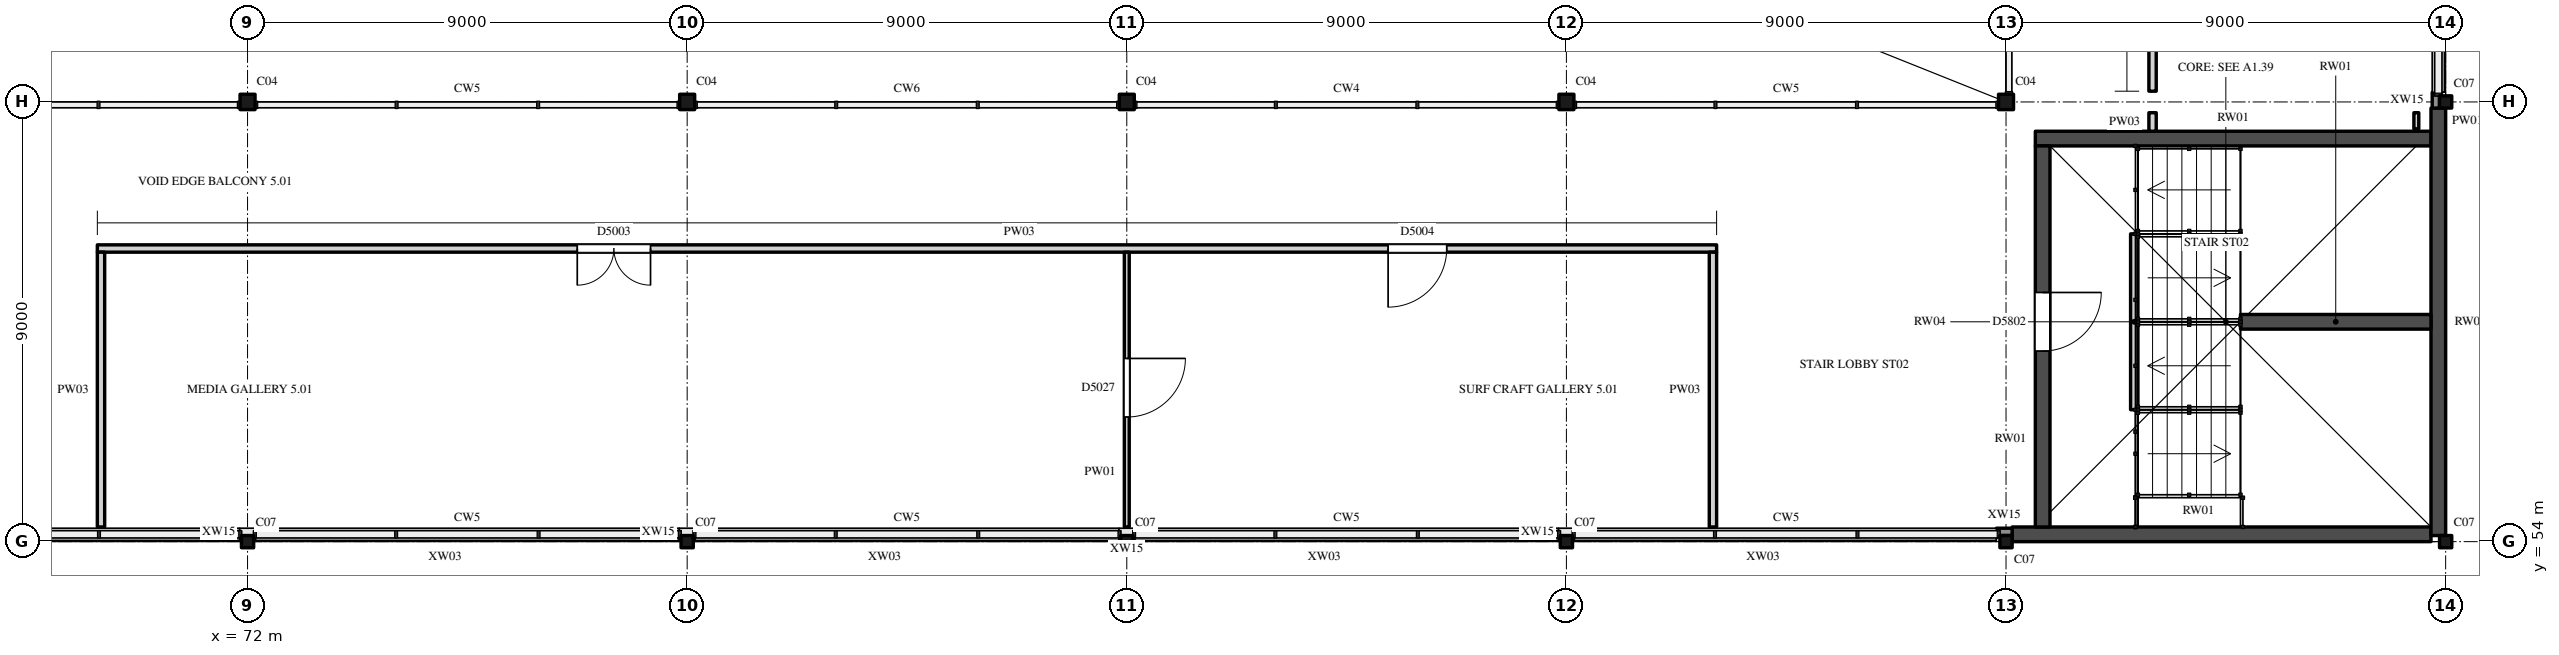
"""IFC4 building model, lengths in metres.
Left out: names, types, materials, properties, quantities, classifications, styles, units other than length and angle.
Written with IfcOpenShell. Run it as: python <this file> out.ifc"""

import sys

from ifc_helpers import new_model, si_unit, direction, frame, frame_2d, origin, origin_2d, place, context, subcontext, project, spatial, rectangle, hollow_rectangle, i_section, extrude, element, fill, save


model = new_model("IFC4")
c1 = context("Model", 3, precision=1e-05, world=origin(), true_north=direction((0.0, 1.0)))
c2 = subcontext(c1, "Body", "Model", "MODEL_VIEW")
j1 = project(units=[si_unit("LENGTHUNIT", "METRE"), si_unit("PLANEANGLEUNIT", "RADIAN")], contexts=[c1])
p1 = place(None, origin())
s1 = spatial("IfcSite", under=j1, at=p1, CompositionType="ELEMENT")
p2 = place(p1, origin())
s2 = spatial("IfcBuilding", under=s1, at=p2, CompositionType="ELEMENT")
p3 = place(p2, frame((0.0, 0.0, 31.0)))
s3 = spatial("IfcBuildingStorey", under=s2, at=p3, CompositionType="ELEMENT", Elevation=31.0)
for number, where, z_axis, x_axis in (
    (1, (72.0, 54.0, 0.0), (0.0, 0.0, 1.0), (1.0, 0.0, 0.0)),
    (2, (81.0, 54.0, 0.0), (0.0, 0.0, 1.0), (1.0, 0.0, 0.0)),
    (3, (90.0, 54.0, 0.0), (0.0, 0.0, 1.0), (1.0, 0.0, 0.0)),
    (4, (99.0, 54.0, 0.0), (0.0, 0.0, 1.0), (1.0, 0.0, 0.0)),
    (5, (108.0, 54.0, 0.0), (0.0, 0.0, 1.0), (1.0, 0.0, 0.0)),
    (6, (117.0, 54.0, 0.0), (0.0, 0.0, 1.0), (1.0, 0.0, 0.0)),
):
    element("IfcColumn", number, at=place(p3, frame(where, z_axis=z_axis, x_axis=x_axis)), inside=s3, PredefinedType="COLUMN", context=c2, shape_type="SweptSolid", body=[
        extrude(hollow_rectangle(XDim=0.25, YDim=0.25, WallThickness=0.009, InnerFilletRadius=0.013, OuterFilletRadius=0.022, at=origin_2d()), origin(), (0.0, 0.0, 1.0), 5.0),
    ])
for number, where, z_axis, x_axis in (
    (7, (72.0, 63.0, 0.0), (0.0, 0.0, 1.0), (1.0, 0.0, 0.0)),
    (8, (81.0, 63.0, 0.0), (0.0, 0.0, 1.0), (1.0, 0.0, 0.0)),
    (9, (90.0, 63.0, 0.0), (0.0, 0.0, 1.0), (1.0, 0.0, 0.0)),
    (10, (99.0, 63.0, 0.0), (0.0, 0.0, 1.0), (1.0, 0.0, 0.0)),
    (11, (108.0, 63.0, 0.0), (0.0, 0.0, 1.0), (1.0, 0.0, 0.0)),
):
    element("IfcColumn", number, at=place(p3, frame(where, z_axis=z_axis, x_axis=x_axis)), inside=s3, PredefinedType="COLUMN", context=c2, shape_type="SweptSolid", body=[
        extrude(i_section(OverallWidth=0.307, OverallDepth=0.315, WebThickness=0.012, FlangeThickness=0.019, FilletRadius=0.017, at=origin_2d()), origin(), (0.0, 0.0, 1.0), 5.0),
    ])
p4 = place(p3, frame((117.0, 63.0, 0.0), z_axis=(0.0, 0.0, 1.0), x_axis=(1.0, 0.0, 0.0)))
e12 = element("IfcColumn", 12, at=p4, inside=s3, PredefinedType="COLUMN", context=c2, shape_type="SweptSolid", body=[
    extrude(hollow_rectangle(XDim=0.25, YDim=0.25, WallThickness=0.009, InnerFilletRadius=0.013, OuterFilletRadius=0.022, at=origin_2d()), origin(), (0.0, 0.0, 1.0), 5.0),
])
p5 = place(p3, frame((108.125, 54.15, 0.0), z_axis=(0.0, 0.0, 1.0), x_axis=(1.0, 0.0, 0.0)))
e13 = element("IfcWall", 13, at=p5, inside=s3, PredefinedType="SHEAR", context=c2, shape_type="SweptSolid", body=[
    extrude(rectangle(XDim=8.575, YDim=0.3, at=frame_2d((4.288, 0.0))), origin(), (0.0, 0.0, 1.0), 5.0),
])
p6 = place(p3, frame((108.6, 62.25, 0.0), z_axis=(0.0, 0.0, 1.0), x_axis=(1.0, 0.0, 0.0)))
e14 = element("IfcWall", 14, at=p6, inside=s3, PredefinedType="SHEAR", context=c2, shape_type="SweptSolid", body=[
    extrude(rectangle(XDim=8.1, YDim=0.3, at=frame_2d((4.05, 0.0))), origin(), (0.0, 0.0, 1.0), 5.0),
])
p7 = place(p3, frame((108.75, 54.3, 0.0), z_axis=(0.0, 0.0, 1.0), x_axis=(0.0, 1.0, 0.0)))
e15 = element("IfcWall", 15, at=p7, inside=s3, PredefinedType="SHEAR", context=c2, shape_type="SweptSolid", body=[
    extrude(rectangle(XDim=7.8, YDim=0.3, at=frame_2d((3.9, 0.0))), origin(), (0.0, 0.0, 1.0), 5.0),
])
p8 = place(p7, frame((3.6, 0.0, 0.0)))
e16 = element("IfcOpeningElement", 16, at=p8, cuts=e15, PredefinedType="OPENING", context=c2, shape_type="SweptSolid", body=[
    extrude(rectangle(XDim=1.2, YDim=2.1, at=frame_2d((0.6, 1.05))), frame((0.0, 0.16, 0.0), z_axis=(0.0, -1.0, 0.0), x_axis=(1.0, 0.0, 0.0)), (0.0, 0.0, 1.0), 0.32),
])
p9 = place(p3, frame((116.85, 54.125, 0.0), z_axis=(0.0, 0.0, 1.0), x_axis=(0.0, 1.0, 0.0)))
e17 = element("IfcWall", 17, at=p9, inside=s3, PredefinedType="SHEAR", context=c2, shape_type="SweptSolid", body=[
    extrude(rectangle(XDim=8.75, YDim=0.3, at=frame_2d((4.375, 0.0))), origin(), (0.0, 0.0, 1.0), 5.0),
])
p10 = place(p3, frame((112.8, 58.5, 0.0), z_axis=(0.0, 0.0, 1.0), x_axis=(1.0, 0.0, 0.0)))
e18 = element("IfcWall", 18, at=p10, inside=s3, PredefinedType="SHEAR", context=c2, shape_type="SweptSolid", body=[
    extrude(rectangle(XDim=3.9, YDim=0.3, at=frame_2d((1.95, 0.0))), origin(), (0.0, 0.0, 1.0), 5.0),
])
p11 = place(p3, frame((110.625, 56.7, 0.0), z_axis=(0.0, 0.0, 1.0), x_axis=(0.0, 1.0, 0.0)))
e19 = element("IfcWall", 19, at=p11, inside=s3, PredefinedType="STANDARD", context=c2, shape_type="SweptSolid", body=[
    extrude(rectangle(XDim=3.6, YDim=0.15, at=frame_2d((1.8, 0.0))), origin(), (0.0, 0.0, 1.0), 2.3),
])
p12 = place(p3, frame((63.197, 54.15, 0.0), z_axis=(0.0, 0.0, 1.0), x_axis=(1.0, 0.0, 0.0)))
e20 = element("IfcWall", 20, at=p12, inside=s3, PredefinedType="SOLIDWALL", context=c2, shape_type="SweptSolid", body=[
    extrude(rectangle(XDim=8.642, YDim=0.25, at=frame_2d((4.321, 0.0))), origin(), (0.0, 0.0, 1.0), 1.1),
])
for number, where, z_axis, x_axis in (
    (21, (72.161, 54.15, 0.0), (0.0, 0.0, 1.0), (1.0, 0.0, 0.0)),
    (22, (81.161, 54.15, 0.0), (0.0, 0.0, 1.0), (1.0, 0.0, 0.0)),
    (23, (90.161, 54.15, 0.0), (0.0, 0.0, 1.0), (1.0, 0.0, 0.0)),
):
    element("IfcWall", number, at=place(p3, frame(where, z_axis=z_axis, x_axis=x_axis)), inside=s3, PredefinedType="SOLIDWALL", context=c2, shape_type="SweptSolid", body=[
        extrude(rectangle(XDim=8.678, YDim=0.25, at=frame_2d((4.339, 0.0))), origin(), (0.0, 0.0, 1.0), 1.1),
    ])
for number, where, z_axis, x_axis in (
    (24, (99.161, 54.15, 0.0), (0.0, 0.0, 1.0), (1.0, 0.0, 0.0)),
    (25, (116.85, 63.197, 0.0), (0.0, 0.0, 1.0), (0.0, 1.0, 0.0)),
):
    element("IfcWall", number, at=place(p3, frame(where, z_axis=z_axis, x_axis=x_axis)), inside=s3, PredefinedType="SOLIDWALL", context=c2, shape_type="SweptSolid", body=[
        extrude(rectangle(XDim=8.642, YDim=0.25, at=frame_2d((4.321, 0.0))), origin(), (0.0, 0.0, 1.0), 1.1),
    ])
for number, where, z_axis, x_axis in (
    (26, (71.839, 54.2, 0.0), (0.0, 0.0, 1.0), (1.0, 0.0, 0.0)),
    (27, (80.839, 54.2, 0.0), (0.0, 0.0, 1.0), (1.0, 0.0, 0.0)),
    (28, (89.839, 54.2, 0.0), (0.0, 0.0, 1.0), (1.0, 0.0, 0.0)),
    (29, (98.839, 54.2, 0.0), (0.0, 0.0, 1.0), (1.0, 0.0, 0.0)),
):
    element("IfcWall", number, at=place(p3, frame(where, z_axis=z_axis, x_axis=x_axis)), inside=s3, PredefinedType="SOLIDWALL", context=c2, shape_type="SweptSolid", body=[
        extrude(rectangle(XDim=0.322, YDim=0.15, at=frame_2d((0.161, 0.0))), origin(), (0.0, 0.0, 1.0), 1.1),
    ])
for number, where, z_axis, x_axis in (
    (30, (107.803, 54.2, 0.0), (0.0, 0.0, 1.0), (1.0, 0.0, 0.0)),
    (31, (116.8, 62.875, 0.0), (0.0, 0.0, 1.0), (0.0, 1.0, 0.0)),
):
    element("IfcWall", number, at=place(p3, frame(where, z_axis=z_axis, x_axis=x_axis)), inside=s3, PredefinedType="SOLIDWALL", context=c2, shape_type="SweptSolid", body=[
        extrude(rectangle(XDim=0.322, YDim=0.15, at=frame_2d((0.161, 0.0))), origin(), (0.0, 0.0, 1.0), 5.0),
    ])
p13 = place(p2, frame((0.0, 0.0, 16.0)))
s4 = spatial("IfcBuildingStorey", under=s2, at=p13, CompositionType="ELEMENT", Elevation=16.0)
p14 = place(p13, frame((117.15, 63.0, 16.0), z_axis=(0.0, 0.0, 1.0), x_axis=(1.0, 0.0, 0.0)))
e32 = element("IfcWall", 32, at=p14, inside=s4, PredefinedType="SOLIDWALL", context=c2, shape_type="SweptSolid", body=[
    extrude(rectangle(XDim=53.7, YDim=0.3, at=frame_2d((26.85, 0.0))), origin(), (0.0, 0.0, 1.0), 0.9),
])
p15 = place(p14, frame((0.15, 0.0, 0.15)))
e33 = element("IfcOpeningElement", 33, at=p15, cuts=e32, PredefinedType="OPENING", context=c2, shape_type="SweptSolid", body=[
    extrude(rectangle(XDim=2.4, YDim=0.6, at=frame_2d((1.2, 0.3))), frame((0.0, 0.16, 0.0), z_axis=(0.0, -1.0, 0.0), x_axis=(1.0, 0.0, 0.0)), (0.0, 0.0, 1.0), 0.32),
])
p16 = place(p14, frame((3.15, 0.0, 0.15)))
e34 = element("IfcOpeningElement", 34, at=p16, cuts=e32, PredefinedType="OPENING", context=c2, shape_type="SweptSolid", body=[
    extrude(rectangle(XDim=2.4, YDim=0.6, at=frame_2d((1.2, 0.3))), frame((0.0, 0.16, 0.0), z_axis=(0.0, -1.0, 0.0), x_axis=(1.0, 0.0, 0.0)), (0.0, 0.0, 1.0), 0.32),
])
p17 = place(p14, frame((6.15, 0.0, 0.15)))
e35 = element("IfcOpeningElement", 35, at=p17, cuts=e32, PredefinedType="OPENING", context=c2, shape_type="SweptSolid", body=[
    extrude(rectangle(XDim=2.4, YDim=0.6, at=frame_2d((1.2, 0.3))), frame((0.0, 0.16, 0.0), z_axis=(0.0, -1.0, 0.0), x_axis=(1.0, 0.0, 0.0)), (0.0, 0.0, 1.0), 0.32),
])
p18 = place(p14, frame((9.15, 0.0, 0.15)))
e36 = element("IfcOpeningElement", 36, at=p18, cuts=e32, PredefinedType="OPENING", context=c2, shape_type="SweptSolid", body=[
    extrude(rectangle(XDim=2.4, YDim=0.6, at=frame_2d((1.2, 0.3))), frame((0.0, 0.16, 0.0), z_axis=(0.0, -1.0, 0.0), x_axis=(1.0, 0.0, 0.0)), (0.0, 0.0, 1.0), 0.32),
])
p19 = place(p14, frame((12.15, 0.0, 0.15)))
e37 = element("IfcOpeningElement", 37, at=p19, cuts=e32, PredefinedType="OPENING", context=c2, shape_type="SweptSolid", body=[
    extrude(rectangle(XDim=2.4, YDim=0.6, at=frame_2d((1.2, 0.3))), frame((0.0, 0.16, 0.0), z_axis=(0.0, -1.0, 0.0), x_axis=(1.0, 0.0, 0.0)), (0.0, 0.0, 1.0), 0.32),
])
p20 = place(p14, frame((15.15, 0.0, 0.15)))
e38 = element("IfcOpeningElement", 38, at=p20, cuts=e32, PredefinedType="OPENING", context=c2, shape_type="SweptSolid", body=[
    extrude(rectangle(XDim=2.4, YDim=0.6, at=frame_2d((1.2, 0.3))), frame((0.0, 0.16, 0.0), z_axis=(0.0, -1.0, 0.0), x_axis=(1.0, 0.0, 0.0)), (0.0, 0.0, 1.0), 0.32),
])
p21 = place(p14, frame((18.15, 0.0, 0.15)))
e39 = element("IfcOpeningElement", 39, at=p21, cuts=e32, PredefinedType="OPENING", context=c2, shape_type="SweptSolid", body=[
    extrude(rectangle(XDim=2.4, YDim=0.6, at=frame_2d((1.2, 0.3))), frame((0.0, 0.16, 0.0), z_axis=(0.0, -1.0, 0.0), x_axis=(1.0, 0.0, 0.0)), (0.0, 0.0, 1.0), 0.32),
])
p22 = place(p14, frame((21.15, 0.0, 0.15)))
e40 = element("IfcOpeningElement", 40, at=p22, cuts=e32, PredefinedType="OPENING", context=c2, shape_type="SweptSolid", body=[
    extrude(rectangle(XDim=2.4, YDim=0.6, at=frame_2d((1.2, 0.3))), frame((0.0, 0.16, 0.0), z_axis=(0.0, -1.0, 0.0), x_axis=(1.0, 0.0, 0.0)), (0.0, 0.0, 1.0), 0.32),
])
p23 = place(p14, frame((24.15, 0.0, 0.15)))
e41 = element("IfcOpeningElement", 41, at=p23, cuts=e32, PredefinedType="OPENING", context=c2, shape_type="SweptSolid", body=[
    extrude(rectangle(XDim=2.4, YDim=0.6, at=frame_2d((1.2, 0.3))), frame((0.0, 0.16, 0.0), z_axis=(0.0, -1.0, 0.0), x_axis=(1.0, 0.0, 0.0)), (0.0, 0.0, 1.0), 0.32),
])
p24 = place(p14, frame((27.15, 0.0, 0.15)))
e42 = element("IfcOpeningElement", 42, at=p24, cuts=e32, PredefinedType="OPENING", context=c2, shape_type="SweptSolid", body=[
    extrude(rectangle(XDim=2.4, YDim=0.6, at=frame_2d((1.2, 0.3))), frame((0.0, 0.16, 0.0), z_axis=(0.0, -1.0, 0.0), x_axis=(1.0, 0.0, 0.0)), (0.0, 0.0, 1.0), 0.32),
])
p25 = place(p14, frame((30.15, 0.0, 0.15)))
e43 = element("IfcOpeningElement", 43, at=p25, cuts=e32, PredefinedType="OPENING", context=c2, shape_type="SweptSolid", body=[
    extrude(rectangle(XDim=2.4, YDim=0.6, at=frame_2d((1.2, 0.3))), frame((0.0, 0.16, 0.0), z_axis=(0.0, -1.0, 0.0), x_axis=(1.0, 0.0, 0.0)), (0.0, 0.0, 1.0), 0.32),
])
p26 = place(p14, frame((33.15, 0.0, 0.15)))
e44 = element("IfcOpeningElement", 44, at=p26, cuts=e32, PredefinedType="OPENING", context=c2, shape_type="SweptSolid", body=[
    extrude(rectangle(XDim=2.4, YDim=0.6, at=frame_2d((1.2, 0.3))), frame((0.0, 0.16, 0.0), z_axis=(0.0, -1.0, 0.0), x_axis=(1.0, 0.0, 0.0)), (0.0, 0.0, 1.0), 0.32),
])
p27 = place(p14, frame((36.15, 0.0, 0.15)))
e45 = element("IfcOpeningElement", 45, at=p27, cuts=e32, PredefinedType="OPENING", context=c2, shape_type="SweptSolid", body=[
    extrude(rectangle(XDim=2.4, YDim=0.6, at=frame_2d((1.2, 0.3))), frame((0.0, 0.16, 0.0), z_axis=(0.0, -1.0, 0.0), x_axis=(1.0, 0.0, 0.0)), (0.0, 0.0, 1.0), 0.32),
])
p28 = place(p14, frame((39.15, 0.0, 0.15)))
e46 = element("IfcOpeningElement", 46, at=p28, cuts=e32, PredefinedType="OPENING", context=c2, shape_type="SweptSolid", body=[
    extrude(rectangle(XDim=2.4, YDim=0.6, at=frame_2d((1.2, 0.3))), frame((0.0, 0.16, 0.0), z_axis=(0.0, -1.0, 0.0), x_axis=(1.0, 0.0, 0.0)), (0.0, 0.0, 1.0), 0.32),
])
p29 = place(p14, frame((42.15, 0.0, 0.15)))
e47 = element("IfcOpeningElement", 47, at=p29, cuts=e32, PredefinedType="OPENING", context=c2, shape_type="SweptSolid", body=[
    extrude(rectangle(XDim=2.4, YDim=0.6, at=frame_2d((1.2, 0.3))), frame((0.0, 0.16, 0.0), z_axis=(0.0, -1.0, 0.0), x_axis=(1.0, 0.0, 0.0)), (0.0, 0.0, 1.0), 0.32),
])
p30 = place(p14, frame((45.15, 0.0, 0.15)))
e48 = element("IfcOpeningElement", 48, at=p30, cuts=e32, PredefinedType="OPENING", context=c2, shape_type="SweptSolid", body=[
    extrude(rectangle(XDim=2.4, YDim=0.6, at=frame_2d((1.2, 0.3))), frame((0.0, 0.16, 0.0), z_axis=(0.0, -1.0, 0.0), x_axis=(1.0, 0.0, 0.0)), (0.0, 0.0, 1.0), 0.32),
])
p31 = place(p14, frame((48.15, 0.0, 0.15)))
e49 = element("IfcOpeningElement", 49, at=p31, cuts=e32, PredefinedType="OPENING", context=c2, shape_type="SweptSolid", body=[
    extrude(rectangle(XDim=2.4, YDim=0.6, at=frame_2d((1.2, 0.3))), frame((0.0, 0.16, 0.0), z_axis=(0.0, -1.0, 0.0), x_axis=(1.0, 0.0, 0.0)), (0.0, 0.0, 1.0), 0.32),
])
p32 = place(p14, frame((51.15, 0.0, 0.15)))
e50 = element("IfcOpeningElement", 50, at=p32, cuts=e32, PredefinedType="OPENING", context=c2, shape_type="SweptSolid", body=[
    extrude(rectangle(XDim=2.4, YDim=0.6, at=frame_2d((1.2, 0.3))), frame((0.0, 0.16, 0.0), z_axis=(0.0, -1.0, 0.0), x_axis=(1.0, 0.0, 0.0)), (0.0, 0.0, 1.0), 0.32),
])
p33 = place(p3, frame((68.925, 60.0, 0.0), z_axis=(0.0, 0.0, 1.0), x_axis=(1.0, 0.0, 0.0)))
e51 = element("IfcWall", 51, at=p33, inside=s3, PredefinedType="PARTITIONING", context=c2, shape_type="SweptSolid", body=[
    extrude(rectangle(XDim=33.15, YDim=0.15, at=frame_2d((16.575, 0.0))), origin(), (0.0, 0.0, 1.0), 4.521),
])
p34 = place(p33, frame((9.825, 0.0, 0.0)))
e52 = element("IfcOpeningElement", 52, at=p34, cuts=e51, PredefinedType="OPENING", context=c2, shape_type="SweptSolid", body=[
    extrude(rectangle(XDim=1.5, YDim=2.4, at=frame_2d((0.75, 1.2))), frame((0.0, 0.085, 0.0), z_axis=(0.0, -1.0, 0.0), x_axis=(1.0, 0.0, 0.0)), (0.0, 0.0, 1.0), 0.17),
])
p35 = place(p33, frame((26.425, 0.0, 0.0)))
e53 = element("IfcOpeningElement", 53, at=p35, cuts=e51, PredefinedType="OPENING", context=c2, shape_type="SweptSolid", body=[
    extrude(rectangle(XDim=1.2, YDim=2.4, at=frame_2d((0.6, 1.2))), frame((0.0, 0.085, 0.0), z_axis=(0.0, -1.0, 0.0), x_axis=(1.0, 0.0, 0.0)), (0.0, 0.0, 1.0), 0.17),
])
p36 = place(p3, frame((69.0, 54.3, 0.0), z_axis=(0.0, 0.0, 1.0), x_axis=(0.0, 1.0, 0.0)))
e54 = element("IfcWall", 54, at=p36, inside=s3, PredefinedType="PARTITIONING", context=c2, shape_type="SweptSolid", body=[
    extrude(rectangle(XDim=5.625, YDim=0.15, at=frame_2d((2.812, 0.0))), origin(), (0.0, 0.0, 1.0), 4.825),
])
p37 = place(p3, frame((90.0, 54.3, 0.0), z_axis=(0.0, 0.0, 1.0), x_axis=(0.0, 1.0, 0.0)))
e55 = element("IfcWall", 55, at=p37, inside=s3, PredefinedType="PARTITIONING", context=c2, shape_type="SweptSolid", body=[
    extrude(rectangle(XDim=5.625, YDim=0.1, at=frame_2d((2.812, 0.0))), origin(), (0.0, 0.0, 1.0), 4.419),
])
p38 = place(p37, frame((2.25, 0.0, 0.0)))
e56 = element("IfcOpeningElement", 56, at=p38, cuts=e55, PredefinedType="OPENING", context=c2, shape_type="SweptSolid", body=[
    extrude(rectangle(XDim=1.2, YDim=2.4, at=frame_2d((0.6, 1.2))), frame((0.0, 0.06, 0.0), z_axis=(0.0, -1.0, 0.0), x_axis=(1.0, 0.0, 0.0)), (0.0, 0.0, 1.0), 0.12),
])
p39 = place(p3, frame((102.0, 54.3, 0.0), z_axis=(0.0, 0.0, 1.0), x_axis=(0.0, 1.0, 0.0)))
e57 = element("IfcWall", 57, at=p39, inside=s3, PredefinedType="PARTITIONING", context=c2, shape_type="SweptSolid", body=[
    extrude(rectangle(XDim=5.625, YDim=0.15, at=frame_2d((2.812, 0.0))), origin(), (0.0, 0.0, 1.0), 4.825),
])
p40 = place(p3, frame((111.0, 62.4, 0.0), z_axis=(0.0, 0.0, 1.0), x_axis=(0.0, 1.0, 0.0)))
e58 = element("IfcWall", 58, at=p40, inside=s3, PredefinedType="PARTITIONING", context=c2, shape_type="SweptSolid", body=[
    extrude(rectangle(XDim=0.38, YDim=0.15, at=frame_2d((0.19, 0.0))), origin(), (0.0, 0.0, 1.0), 4.825),
])
p41 = place(p3, frame((111.0, 63.22, 0.0), z_axis=(0.0, 0.0, 1.0), x_axis=(0.0, 1.0, 0.0)))
e59 = element("IfcWall", 59, at=p41, inside=s3, PredefinedType="PARTITIONING", context=c2, shape_type="SweptSolid", body=[
    extrude(rectangle(XDim=17.56, YDim=0.15, at=frame_2d((8.78, 0.0))), origin(), (0.0, 0.0, 1.0), 4.825),
])
p42 = place(p41, frame((8.05, 0.0, 0.0)))
e60 = element("IfcOpeningElement", 60, at=p42, cuts=e59, PredefinedType="OPENING", context=c2, shape_type="SweptSolid", body=[
    extrude(rectangle(XDim=1.5, YDim=2.4, at=frame_2d((0.75, 1.2))), frame((0.0, 0.085, 0.0), z_axis=(0.0, -1.0, 0.0), x_axis=(1.0, 0.0, 0.0)), (0.0, 0.0, 1.0), 0.17),
])
p43 = place(p3, frame((116.4, 62.45, 0.0), z_axis=(0.0, 0.0, 1.0), x_axis=(0.0, 1.0, 0.0)))
e61 = element("IfcWall", 61, at=p43, inside=s3, PredefinedType="PARTITIONING", context=c2, shape_type="SweptSolid", body=[
    extrude(rectangle(XDim=0.33, YDim=0.1, at=frame_2d((0.165, 0.0))), origin(), (0.0, 0.0, 1.0), 4.825),
])
p44 = place(p8, origin())
e62 = element("IfcDoor", 62, at=p44, inside=s3, OperationType="SINGLE_SWING_RIGHT", PredefinedType="DOOR", context=c2, shape_type="SweptSolid", body=[
    extrude(rectangle(XDim=1.2, YDim=2.1, at=frame_2d((0.6, 1.05))), frame((0.0, 0.025, 0.0), z_axis=(0.0, -1.0, 0.0), x_axis=(1.0, 0.0, 0.0)), (0.0, 0.0, 1.0), 0.05),
])
fill(e16, e62)
p45 = place(p34, origin())
e63 = element("IfcDoor", 63, at=p45, inside=s3, OperationType="DOUBLE_DOOR_SINGLE_SWING", PredefinedType="DOOR", context=c2, shape_type="SweptSolid", body=[
    extrude(rectangle(XDim=1.5, YDim=2.4, at=frame_2d((0.75, 1.2))), frame((0.0, 0.025, 0.0), z_axis=(0.0, -1.0, 0.0), x_axis=(1.0, 0.0, 0.0)), (0.0, 0.0, 1.0), 0.05),
])
fill(e52, e63)
p46 = place(p35, origin())
e64 = element("IfcDoor", 64, at=p46, inside=s3, OperationType="SINGLE_SWING_LEFT", PredefinedType="DOOR", context=c2, shape_type="SweptSolid", body=[
    extrude(rectangle(XDim=1.2, YDim=2.4, at=frame_2d((0.6, 1.2))), frame((0.0, 0.025, 0.0), z_axis=(0.0, -1.0, 0.0), x_axis=(1.0, 0.0, 0.0)), (0.0, 0.0, 1.0), 0.05),
])
fill(e53, e64)
p47 = place(p38, origin())
e65 = element("IfcDoor", 65, at=p47, inside=s3, OperationType="SINGLE_SWING_RIGHT", PredefinedType="DOOR", context=c2, shape_type="SweptSolid", body=[
    extrude(rectangle(XDim=1.2, YDim=2.4, at=frame_2d((0.6, 1.2))), frame((0.0, 0.025, 0.0), z_axis=(0.0, -1.0, 0.0), x_axis=(1.0, 0.0, 0.0)), (0.0, 0.0, 1.0), 0.05),
])
fill(e56, e65)
save(model, sys.argv[1])
